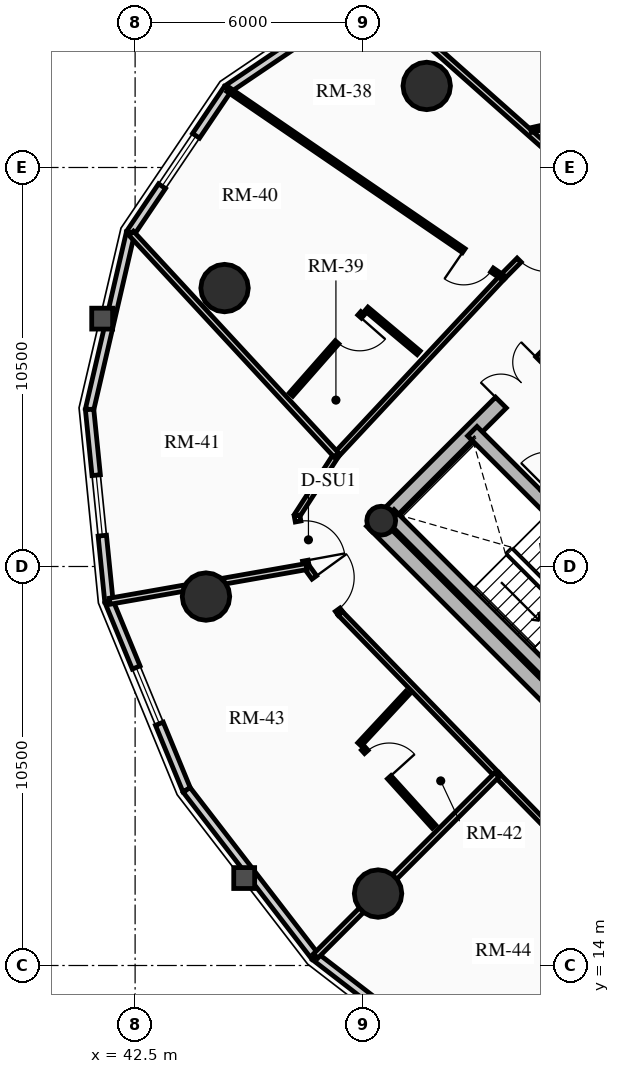
"""IFC4 building model, lengths in metres.
Left out: names, types, materials, properties, quantities, classifications, styles, units other than length and angle.
Written with IfcOpenShell. Run it as: python <this file> out.ifc"""

import sys

from ifc_helpers import new_model, si_unit, direction, frame, frame_2d, origin, origin_2d, place, context, subcontext, project, spatial, rectangle, circle, hollow_circle, extrude, source, transform, mapped, element, fill, save


model = new_model("IFC4")
c1 = context("Model", 3, precision=1e-05, world=origin(), true_north=direction((0.0, 1.0)))
c2 = subcontext(c1, "Body", "Model", "MODEL_VIEW")
j1 = project(units=[si_unit("LENGTHUNIT", "METRE"), si_unit("PLANEANGLEUNIT", "RADIAN")], contexts=[c1])
p1 = place(None, origin())
s1 = spatial("IfcSite", under=j1, at=p1, CompositionType="ELEMENT")
p2 = place(p1, origin())
s2 = spatial("IfcBuilding", under=s1, at=p2, CompositionType="ELEMENT")
p3 = place(p2, frame((0.0, 0.0, 154.51)))
s3 = spatial("IfcBuildingStorey", under=s2, at=p3, CompositionType="ELEMENT", Elevation=154.51)
p4 = place(p3, frame((58.702, 15.732, 0.0), z_axis=(0.0, 0.0, 1.0), x_axis=(-0.707106781187, 0.707106781187, 0.0)))
e1 = element("IfcWall", 1, at=p4, inside=s3, PredefinedType="SHEAR", context=c2, shape_type="SweptSolid", body=[
    extrude(rectangle(XDim=14.1, YDim=0.4, at=frame_2d((7.05, 0.0))), origin(), (0.0, 0.0, 1.0), 2.91),
])
p5 = place(p3, frame((48.873, 25.561, 0.0), z_axis=(0.0, 0.0, 1.0), x_axis=(0.707106781187, 0.707106781187, 0.0)))
e2 = element("IfcWall", 2, at=p5, inside=s3, PredefinedType="SHEAR", context=c2, shape_type="SweptSolid", body=[
    extrude(rectangle(XDim=10.7, YDim=0.4, at=frame_2d((5.35, 0.0))), origin(), (0.0, 0.0, 1.0), 2.91),
])
m1 = source(origin(), c2, "Body", "SweptSolid", [
    extrude(rectangle(XDim=1.5, YDim=2.02, at=frame_2d((0.75, 1.01))), frame((0.0, 0.21, 0.0), z_axis=(0.0, -1.0, 0.0), x_axis=(1.0, 0.0, 0.0)), (0.0, 0.0, 1.0), 0.42),
])
p6 = place(p5, frame((4.6, 0.0, 0.0)))
e3 = element("IfcOpeningElement", 3, at=p6, cuts=e2, PredefinedType="OPENING", context=c2, shape_type="MappedRepresentation", body=[
    mapped(m1, transform((0.0, 0.0, 0.0), x_axis=(1.0, 0.0, 0.0), y_axis=(0.0, 1.0, 0.0), z_axis=(0.0, 0.0, 1.0), scale=1.0)),
])
p7 = place(p3, frame((61.06, 18.373, 0.0), z_axis=(0.0, 0.0, 1.0), x_axis=(-0.707106781187, 0.707106781187, 0.0)))
e4 = element("IfcWall", 4, at=p7, inside=s3, PredefinedType="SHEAR", context=c2, shape_type="SweptSolid", body=[
    extrude(rectangle(XDim=13.7, YDim=0.35, at=frame_2d((6.85, 0.0))), origin(), (0.0, 0.0, 1.0), 2.91),
])
m2 = source(origin(), c2, "Body", "SweptSolid", [
    extrude(rectangle(XDim=1.1, YDim=2.015, at=frame_2d((0.55, 1.007))), frame((0.0, 0.185, 0.0), z_axis=(0.0, -1.0, 0.0), x_axis=(1.0, 0.0, 0.0)), (0.0, 0.0, 1.0), 0.37),
])
p8 = place(p7, frame((4.85, 0.0, 0.0)))
e5 = element("IfcOpeningElement", 5, at=p8, cuts=e4, PredefinedType="OPENING", context=c2, shape_type="MappedRepresentation", body=[
    mapped(m2, transform((0.0, 0.0, 0.0), x_axis=(1.0, 0.0, 0.0), y_axis=(0.0, 1.0, 0.0), z_axis=(0.0, 0.0, 1.0), scale=1.0)),
])
p9 = place(p7, frame((0.625, 0.0, 0.0)))
e6 = element("IfcOpeningElement", 6, at=p9, cuts=e4, PredefinedType="OPENING", context=c2, shape_type="MappedRepresentation", body=[
    mapped(m2, transform((0.0, 0.0, 0.0), x_axis=(1.0, 0.0, 0.0), y_axis=(0.0, 1.0, 0.0), z_axis=(0.0, 0.0, 1.0), scale=1.0)),
])
p10 = place(p7, frame((2.625, 0.0, 0.0)))
e7 = element("IfcOpeningElement", 7, at=p10, cuts=e4, PredefinedType="OPENING", context=c2, shape_type="MappedRepresentation", body=[
    mapped(m2, transform((0.0, 0.0, 0.0), x_axis=(1.0, 0.0, 0.0), y_axis=(0.0, 1.0, 0.0), z_axis=(0.0, 0.0, 1.0), scale=1.0)),
])
m3 = source(origin(), c2, "Body", "SweptSolid", [
    extrude(rectangle(XDim=1.15, YDim=2.02, at=frame_2d((0.575, 1.01))), frame((0.0, 0.185, 0.0), z_axis=(0.0, -1.0, 0.0), x_axis=(1.0, 0.0, 0.0)), (0.0, 0.0, 1.0), 0.37),
])
p11 = place(p7, frame((7.27, 0.0, 0.0)))
e8 = element("IfcOpeningElement", 8, at=p11, cuts=e4, PredefinedType="OPENING", context=c2, shape_type="MappedRepresentation", body=[
    mapped(m3, transform((0.0, 0.0, 0.0), x_axis=(1.0, 0.0, 0.0), y_axis=(0.0, 1.0, 0.0), z_axis=(0.0, 0.0, 1.0), scale=1.0)),
])
p12 = place(p3, frame((53.922, 21.141, 0.0), z_axis=(0.0, 0.0, 1.0), x_axis=(-0.707106781187, 0.707106781187, 0.0)))
e9 = element("IfcWall", 9, at=p12, inside=s3, PredefinedType="SHEAR", context=c2, shape_type="SweptSolid", body=[
    extrude(rectangle(XDim=6.695, YDim=0.35, at=frame_2d((3.348, 0.0))), origin(), (0.0, 0.0, 1.0), 2.91),
])
p13 = place(p3, frame((48.976, 25.706, 0.0), z_axis=(0.0, 0.0, 1.0), x_axis=(0.707106781187, 0.707106781187, 0.0)))
e10 = element("IfcColumn", 10, at=p13, inside=s3, PredefinedType="COLUMN", context=c2, shape_type="SweptSolid", body=[
    extrude(hollow_circle(Radius=0.38, WallThickness=0.032, at=origin_2d()), origin(), (0.0, 0.0, 1.0), 2.91),
])
for number, where, z_axis, x_axis in (
    (11, (50.173, 37.146, 0.0), (0.0, 0.0, 1.0), (1.0, 0.0, 0.0)),
    (12, (44.854, 31.827, 0.0), (0.0, 0.0, 1.0), (1.0, 0.0, 0.0)),
    (13, (44.365, 23.709, 0.0), (0.0, 0.0, 1.0), (1.0, 0.0, 0.0)),
    (14, (48.893, 15.893, 0.0), (0.0, 0.0, 1.0), (1.0, 0.0, 0.0)),
):
    element("IfcColumn", number, at=place(p3, frame(where, z_axis=z_axis, x_axis=x_axis)), inside=s3, PredefinedType="USERDEFINED", context=c2, shape_type="SweptSolid", body=[
        extrude(circle(Radius=0.625, at=origin_2d()), origin(), (0.0, 0.0, 1.0), 2.91),
    ])
p14 = place(p3, frame((44.935, 37.065, 0.0), z_axis=(0.0, 0.0, 1.0), x_axis=(0.828739009952, 0.559635286042, 0.0)))
e15 = element("IfcWall", 15, at=p14, inside=s3, PredefinedType="SOLIDWALL", context=c2, shape_type="SweptSolid", body=[
    extrude(rectangle(XDim=4.569, YDim=0.22, at=frame_2d((2.284, 0.0))), origin(), (0.0, 0.0, 1.0), 2.245),
])
p15 = place(p3, frame((42.378, 33.279, 0.0), z_axis=(0.0, 0.0, 1.0), x_axis=(0.559635286042, 0.828739009952, 0.0)))
e16 = element("IfcWall", 16, at=p15, inside=s3, PredefinedType="SOLIDWALL", context=c2, shape_type="SweptSolid", body=[
    extrude(rectangle(XDim=4.569, YDim=0.22, at=frame_2d((2.284, 0.0))), origin(), (0.0, 0.0, 1.0), 2.245),
])
m4 = source(origin(), c2, "Body", "SweptSolid", [
    extrude(rectangle(XDim=1.6, YDim=1.3, at=frame_2d((0.8, 0.65))), frame((0.0, 0.12, 0.0), z_axis=(0.0, -1.0, 0.0), x_axis=(1.0, 0.0, 0.0)), (0.0, 0.0, 1.0), 0.24),
])
p16 = place(p15, frame((1.484, 0.0, 0.65)))
e17 = element("IfcOpeningElement", 17, at=p16, cuts=e16, PredefinedType="OPENING", context=c2, shape_type="MappedRepresentation", body=[
    mapped(m4, transform((0.0, 0.0, 0.0), x_axis=(1.0, 0.0, 0.0), y_axis=(0.0, 1.0, 0.0), z_axis=(0.0, 0.0, 1.0), scale=1.0)),
])
p17 = place(p3, frame((41.302, 28.633, 0.0), z_axis=(0.0, 0.0, 1.0), x_axis=(0.225659540039, 0.974206226622, 0.0)))
e18 = element("IfcWall", 18, at=p17, inside=s3, PredefinedType="SOLIDWALL", context=c2, shape_type="SweptSolid", body=[
    extrude(rectangle(XDim=4.769, YDim=0.22, at=frame_2d((2.385, 0.0))), origin(), (0.0, 0.0, 1.0), 2.245),
])
p18 = place(p3, frame((41.811, 23.582, 0.0), z_axis=(0.0, 0.0, 1.0), x_axis=(-0.100279889424, 0.994959267396, 0.0)))
e19 = element("IfcWall", 19, at=p18, inside=s3, PredefinedType="SOLIDWALL", context=c2, shape_type="SweptSolid", body=[
    extrude(rectangle(XDim=5.076, YDim=0.22, at=frame_2d((2.538, 0.0))), origin(), (0.0, 0.0, 1.0), 2.245),
])
p19 = place(p18, frame((1.738, 0.0, 0.65)))
e20 = element("IfcOpeningElement", 20, at=p19, cuts=e19, PredefinedType="OPENING", context=c2, shape_type="MappedRepresentation", body=[
    mapped(m4, transform((0.0, 0.0, 0.0), x_axis=(1.0, 0.0, 0.0), y_axis=(0.0, 1.0, 0.0), z_axis=(0.0, 0.0, 1.0), scale=1.0)),
])
p20 = place(p3, frame((43.856, 18.622, 0.0), z_axis=(0.0, 0.0, 1.0), x_axis=(-0.38111364655, 0.924528197738, 0.0)))
e21 = element("IfcWall", 21, at=p20, inside=s3, PredefinedType="SOLIDWALL", context=c2, shape_type="SweptSolid", body=[
    extrude(rectangle(XDim=5.366, YDim=0.22, at=frame_2d((2.683, 0.0))), origin(), (0.0, 0.0, 1.0), 2.245),
])
p21 = place(p20, frame((1.883, 0.0, 0.65)))
e22 = element("IfcOpeningElement", 22, at=p21, cuts=e21, PredefinedType="OPENING", context=c2, shape_type="MappedRepresentation", body=[
    mapped(m4, transform((0.0, 0.0, 0.0), x_axis=(1.0, 0.0, 0.0), y_axis=(0.0, 1.0, 0.0), z_axis=(0.0, 0.0, 1.0), scale=1.0)),
])
p22 = place(p3, frame((47.236, 14.236, 0.0), z_axis=(0.0, 0.0, 1.0), x_axis=(-0.610543584779, 0.791982658323, 0.0)))
e23 = element("IfcWall", 23, at=p22, inside=s3, PredefinedType="SOLIDWALL", context=c2, shape_type="SweptSolid", body=[
    extrude(rectangle(XDim=5.537, YDim=0.22, at=frame_2d((2.769, 0.0))), origin(), (0.0, 0.0, 1.0), 2.245),
])
p23 = place(p3, frame((51.622, 10.856, 0.0), z_axis=(0.0, 0.0, 1.0), x_axis=(-0.791982658323, 0.610543584779, 0.0)))
e24 = element("IfcWall", 24, at=p23, inside=s3, PredefinedType="SOLIDWALL", context=c2, shape_type="SweptSolid", body=[
    extrude(rectangle(XDim=5.537, YDim=0.22, at=frame_2d((2.769, 0.0))), origin(), (0.0, 0.0, 1.0), 2.245),
])
p24 = place(p23, frame((1.968, 0.0, 0.65)))
e25 = element("IfcOpeningElement", 25, at=p24, cuts=e24, PredefinedType="OPENING", context=c2, shape_type="MappedRepresentation", body=[
    mapped(m4, transform((0.0, 0.0, 0.0), x_axis=(1.0, 0.0, 0.0), y_axis=(0.0, 1.0, 0.0), z_axis=(0.0, 0.0, 1.0), scale=1.0)),
])
p25 = place(p3, frame((54.501, 34.479, 0.0), z_axis=(0.0, 0.0, 1.0), x_axis=(-0.70346073929, -0.710734119258, 0.0)))
e26 = element("IfcWall", 26, at=p25, inside=s3, PredefinedType="PARTITIONING", context=c2, shape_type="SweptSolid", body=[
    extrude(rectangle(XDim=3.323, YDim=0.15, at=frame_2d((1.662, 0.0))), origin(), (0.0, 0.0, 1.0), 2.245),
])
m5 = source(origin(), c2, "Body", "SweptSolid", [
    extrude(rectangle(XDim=1.05, YDim=2.015, at=frame_2d((0.525, 1.007))), frame((0.0, 0.085, 0.0), z_axis=(0.0, -1.0, 0.0), x_axis=(1.0, 0.0, 0.0)), (0.0, 0.0, 1.0), 0.17),
])
p26 = place(p25, frame((1.645, 0.0, 0.0)))
e27 = element("IfcOpeningElement", 27, at=p26, cuts=e26, PredefinedType="OPENING", context=c2, shape_type="MappedRepresentation", body=[
    mapped(m5, transform((0.0, 0.0, 0.0), x_axis=(1.0, 0.0, 0.0), y_axis=(0.0, 1.0, 0.0), z_axis=(0.0, 0.0, 1.0), scale=1.0)),
])
p27 = place(p3, frame((52.163, 32.117, 0.0), z_axis=(0.0, 0.0, 1.0), x_axis=(-0.682485296115, -0.730899323154, 0.0)))
e28 = element("IfcWall", 28, at=p27, inside=s3, PredefinedType="PARTITIONING", context=c2, shape_type="SweptSolid", body=[
    extrude(rectangle(XDim=6.404, YDim=0.15, at=frame_2d((3.202, 0.0))), origin(), (0.0, 0.0, 1.0), 2.245),
])
p28 = place(p3, frame((47.792, 27.436, 0.0), z_axis=(0.0, 0.0, 1.0), x_axis=(-0.543086162542, -0.839676973637, 0.0)))
e29 = element("IfcWall", 29, at=p28, inside=s3, PredefinedType="PARTITIONING", context=c2, shape_type="SweptSolid", body=[
    extrude(rectangle(XDim=1.901, YDim=0.15, at=frame_2d((0.95, 0.0))), origin(), (0.0, 0.0, 1.0), 2.245),
])
p29 = place(p3, frame((46.76, 25.84, 0.0), z_axis=(0.0, 0.0, 1.0), x_axis=(0.181230731673, -0.983440604153, 0.0)))
e30 = element("IfcWall", 30, at=p29, inside=s3, PredefinedType="PARTITIONING", context=c2, shape_type="SweptSolid", body=[
    extrude(rectangle(XDim=1.365, YDim=0.15, at=frame_2d((0.682, 0.0))), origin(), (0.0, 0.0, 1.0), 2.245),
])
p30 = place(p29, frame((0.157, 0.0, 0.0)))
e31 = element("IfcOpeningElement", 31, at=p30, cuts=e30, PredefinedType="OPENING", context=c2, shape_type="MappedRepresentation", body=[
    mapped(m5, transform((0.0, 0.0, 0.0), x_axis=(1.0, 0.0, 0.0), y_axis=(0.0, 1.0, 0.0), z_axis=(0.0, 0.0, 1.0), scale=1.0)),
])
p31 = place(p3, frame((47.008, 24.498, 0.0), z_axis=(0.0, 0.0, 1.0), x_axis=(0.586941299514, -0.809629489906, 0.0)))
e32 = element("IfcWall", 32, at=p31, inside=s3, PredefinedType="PARTITIONING", context=c2, shape_type="SweptSolid", body=[
    extrude(rectangle(XDim=1.523, YDim=0.15, at=frame_2d((0.761, 0.0))), origin(), (0.0, 0.0, 1.0), 2.245),
])
p32 = place(p31, frame((0.353, 0.0, 0.0)))
e33 = element("IfcOpeningElement", 33, at=p32, cuts=e32, PredefinedType="OPENING", context=c2, shape_type="MappedRepresentation", body=[
    mapped(m5, transform((0.0, 0.0, 0.0), x_axis=(1.0, 0.0, 0.0), y_axis=(0.0, 1.0, 0.0), z_axis=(0.0, 0.0, 1.0), scale=1.0)),
])
p33 = place(p3, frame((47.901, 23.265, 0.0), z_axis=(0.0, 0.0, 1.0), x_axis=(0.696355965374, -0.717696572019, 0.0)))
e34 = element("IfcWall", 34, at=p33, inside=s3, PredefinedType="PARTITIONING", context=c2, shape_type="SweptSolid", body=[
    extrude(rectangle(XDim=5.915, YDim=0.15, at=frame_2d((2.957, 0.0))), origin(), (0.0, 0.0, 1.0), 2.675),
])
p34 = place(p3, frame((52.02, 19.02, 0.0), z_axis=(0.0, 0.0, 1.0), x_axis=(0.699456449804, -0.71467522332, 0.0)))
e35 = element("IfcWall", 35, at=p34, inside=s3, PredefinedType="PARTITIONING", context=c2, shape_type="SweptSolid", body=[
    extrude(rectangle(XDim=6.032, YDim=0.15, at=frame_2d((3.016, 0.0))), origin(), (0.0, 0.0, 1.0), 2.245),
])
p35 = place(p3, frame((54.501, 34.479, 0.0), z_axis=(0.0, 0.0, 1.0), x_axis=(-0.747641382601, 0.66410267506, 0.0)))
e36 = element("IfcWall", 36, at=p35, inside=s3, PredefinedType="PARTITIONING", context=c2, shape_type="SweptSolid", body=[
    extrude(rectangle(XDim=7.718, YDim=0.16, at=frame_2d((3.859, 0.0))), origin(), (0.0, 0.0, 1.0), 2.245),
])
p36 = place(p3, frame((47.792, 27.436, 0.0), z_axis=(0.0, 0.0, 1.0), x_axis=(-0.679077160958, 0.734066897132, 0.0)))
e37 = element("IfcWall", 37, at=p36, inside=s3, PredefinedType="PARTITIONING", context=c2, shape_type="SweptSolid", body=[
    extrude(rectangle(XDim=7.947, YDim=0.16, at=frame_2d((3.974, 0.0))), origin(), (0.0, 0.0, 1.0), 2.245),
])
p37 = place(p3, frame((47.008, 24.498, 0.0), z_axis=(0.0, 0.0, 1.0), x_axis=(-0.984823741496, -0.173557478046, 0.0)))
e38 = element("IfcWall", 38, at=p37, inside=s3, PredefinedType="PARTITIONING", context=c2, shape_type="SweptSolid", body=[
    extrude(rectangle(XDim=5.257, YDim=0.16, at=frame_2d((2.628, 0.0))), origin(), (0.0, 0.0, 1.0), 2.245),
])
p38 = place(p3, frame((52.02, 19.02, 0.0), z_axis=(0.0, 0.0, 1.0), x_axis=(-0.707106781187, -0.707106781187, 0.0)))
e39 = element("IfcWall", 39, at=p38, inside=s3, PredefinedType="PARTITIONING", context=c2, shape_type="SweptSolid", body=[
    extrude(rectangle(XDim=6.745, YDim=0.16, at=frame_2d((3.373, 0.0))), origin(), (0.0, 0.0, 1.0), 2.245),
])
p39 = place(p3, frame((54.858, 36.425, 0.0), z_axis=(0.0, 0.0, 1.0), x_axis=(-0.975061820415, -0.221933427785, 0.0)))
e40 = element("IfcWall", 40, at=p39, inside=s3, PredefinedType="PARTITIONING", context=c2, shape_type="SweptSolid", body=[
    extrude(rectangle(XDim=1.993, YDim=0.125, at=frame_2d((0.997, 0.0))), origin(), (0.0, 0.0, 1.0), 2.675),
])
m6 = source(origin(), c2, "Body", "SweptSolid", [
    extrude(rectangle(XDim=0.9, YDim=2.005, at=frame_2d((0.45, 1.002))), frame((0.0, 0.073, 0.0), z_axis=(0.0, -1.0, 0.0), x_axis=(1.0, 0.0, 0.0)), (0.0, 0.0, 1.0), 0.145),
])
p40 = place(p39, frame((0.44, 0.0, 0.0)))
e41 = element("IfcOpeningElement", 41, at=p40, cuts=e40, PredefinedType="OPENING", context=c2, shape_type="MappedRepresentation", body=[
    mapped(m6, transform((0.0, 0.0, 0.0), x_axis=(1.0, 0.0, 0.0), y_axis=(0.0, 1.0, 0.0), z_axis=(0.0, 0.0, 1.0), scale=1.0)),
])
p41 = place(p3, frame((52.163, 32.117, 0.0), z_axis=(0.0, 0.0, 1.0), x_axis=(-0.825403853282, 0.564542716707, 0.0)))
e42 = element("IfcWall", 42, at=p41, inside=s3, PredefinedType="PARTITIONING", context=c2, shape_type="SweptSolid", body=[
    extrude(rectangle(XDim=8.74, YDim=0.125, at=frame_2d((4.37, 0.0))), origin(), (0.0, 0.0, 1.0), 2.245),
])
p42 = place(p41, frame((0.33, 0.0, 0.0)))
e43 = element("IfcOpeningElement", 43, at=p42, cuts=e42, PredefinedType="OPENING", context=c2, shape_type="MappedRepresentation", body=[
    mapped(m6, transform((0.0, 0.0, 0.0), x_axis=(1.0, 0.0, 0.0), y_axis=(0.0, 1.0, 0.0), z_axis=(0.0, 0.0, 1.0), scale=1.0)),
])
p43 = place(p3, frame((49.961, 30.124, 0.0), z_axis=(0.0, 0.0, 1.0), x_axis=(-0.766210982885, 0.64258908309, 0.0)))
e44 = element("IfcWall", 44, at=p43, inside=s3, PredefinedType="PARTITIONING", context=c2, shape_type="SweptSolid", body=[
    extrude(rectangle(XDim=1.795, YDim=0.125, at=frame_2d((0.897, 0.0))), origin(), (0.0, 0.0, 1.0), 2.675),
])
p44 = place(p3, frame((48.488, 31.166, 0.0), z_axis=(0.0, 0.0, 1.0), x_axis=(-0.660635615229, -0.750706722956, 0.0)))
e45 = element("IfcWall", 45, at=p44, inside=s3, PredefinedType="PARTITIONING", context=c2, shape_type="SweptSolid", body=[
    extrude(rectangle(XDim=2.852, YDim=0.125, at=frame_2d((1.426, 0.0))), origin(), (0.0, 0.0, 1.0), 2.245),
])
p45 = place(p44, frame((0.12, 0.0, 0.0)))
e46 = element("IfcOpeningElement", 46, at=p45, cuts=e45, PredefinedType="OPENING", context=c2, shape_type="MappedRepresentation", body=[
    mapped(m6, transform((0.0, 0.0, 0.0), x_axis=(1.0, 0.0, 0.0), y_axis=(0.0, 1.0, 0.0), z_axis=(0.0, 0.0, 1.0), scale=1.0)),
])
p46 = place(p3, frame((49.665, 21.171, 0.0), z_axis=(0.0, 0.0, 1.0), x_axis=(-0.681089123144, -0.73220052331, 0.0)))
e47 = element("IfcWall", 47, at=p46, inside=s3, PredefinedType="PARTITIONING", context=c2, shape_type="SweptSolid", body=[
    extrude(rectangle(XDim=1.849, YDim=0.125, at=frame_2d((0.924, 0.0))), origin(), (0.0, 0.0, 1.0), 2.675),
])
p47 = place(p3, frame((48.503, 19.711, 0.0), z_axis=(0.0, 0.0, 1.0), x_axis=(0.671201050003, -0.741275354018, 0.0)))
e48 = element("IfcWall", 48, at=p47, inside=s3, PredefinedType="PARTITIONING", context=c2, shape_type="SweptSolid", body=[
    extrude(rectangle(XDim=2.777, YDim=0.125, at=frame_2d((1.388, 0.0))), origin(), (0.0, 0.0, 1.0), 2.675),
])
p48 = place(p47, frame((0.12, 0.0, 0.0)))
e49 = element("IfcOpeningElement", 49, at=p48, cuts=e48, PredefinedType="OPENING", context=c2, shape_type="MappedRepresentation", body=[
    mapped(m6, transform((0.0, 0.0, 0.0), x_axis=(1.0, 0.0, 0.0), y_axis=(0.0, 1.0, 0.0), z_axis=(0.0, 0.0, 1.0), scale=1.0)),
])
m7 = source(origin(), c2, "Body", "SweptSolid", [
    extrude(rectangle(XDim=1.6, YDim=1.3, at=frame_2d((0.8, 0.65))), frame((0.0, 0.03, 0.0), z_axis=(0.0, -1.0, 0.0), x_axis=(1.0, 0.0, 0.0)), (0.0, 0.0, 1.0), 0.06),
])
p49 = place(p16, origin())
e50 = element("IfcWindow", 50, at=p49, inside=s3, PartitioningType="SINGLE_PANEL", PredefinedType="WINDOW", context=c2, shape_type="MappedRepresentation", body=[
    mapped(m7, transform((0.0, 0.0, 0.0), x_axis=(1.0, 0.0, 0.0), y_axis=(0.0, 1.0, 0.0), z_axis=(0.0, 0.0, 1.0), scale=1.0)),
])
fill(e17, e50)
p50 = place(p19, origin())
e51 = element("IfcWindow", 51, at=p50, inside=s3, PartitioningType="SINGLE_PANEL", PredefinedType="WINDOW", context=c2, shape_type="MappedRepresentation", body=[
    mapped(m7, transform((0.0, 0.0, 0.0), x_axis=(1.0, 0.0, 0.0), y_axis=(0.0, 1.0, 0.0), z_axis=(0.0, 0.0, 1.0), scale=1.0)),
])
fill(e20, e51)
p51 = place(p21, origin())
e52 = element("IfcWindow", 52, at=p51, inside=s3, PartitioningType="SINGLE_PANEL", PredefinedType="WINDOW", context=c2, shape_type="MappedRepresentation", body=[
    mapped(m7, transform((0.0, 0.0, 0.0), x_axis=(1.0, 0.0, 0.0), y_axis=(0.0, 1.0, 0.0), z_axis=(0.0, 0.0, 1.0), scale=1.0)),
])
fill(e22, e52)
m8 = source(origin(), c2, "Body", "SweptSolid", [
    extrude(rectangle(XDim=1.5, YDim=2.02, at=frame_2d((0.75, 1.01))), frame((0.0, 0.025, 0.0), z_axis=(0.0, -1.0, 0.0), x_axis=(1.0, 0.0, 0.0)), (0.0, 0.0, 1.0), 0.05),
])
p52 = place(p6, origin())
e53 = element("IfcDoor", 53, at=p52, inside=s3, OperationType="DOUBLE_DOOR_SINGLE_SWING", PredefinedType="DOOR", context=c2, shape_type="MappedRepresentation", body=[
    mapped(m8, transform((0.0, 0.0, 0.0), x_axis=(1.0, 0.0, 0.0), y_axis=(0.0, 1.0, 0.0), z_axis=(0.0, 0.0, 1.0), scale=1.0)),
])
fill(e3, e53)
m9 = source(origin(), c2, "Body", "SweptSolid", [
    extrude(rectangle(XDim=1.05, YDim=2.015, at=frame_2d((0.525, 1.007))), frame((0.0, 0.025, 0.0), z_axis=(0.0, -1.0, 0.0), x_axis=(1.0, 0.0, 0.0)), (0.0, 0.0, 1.0), 0.05),
])
p53 = place(p26, origin())
e54 = element("IfcDoor", 54, at=p53, inside=s3, OperationType="SINGLE_SWING_LEFT", PredefinedType="DOOR", context=c2, shape_type="MappedRepresentation", body=[
    mapped(m9, transform((0.0, 0.0, 0.0), x_axis=(1.0, 0.0, 0.0), y_axis=(0.0, 1.0, 0.0), z_axis=(0.0, 0.0, 1.0), scale=1.0)),
])
fill(e27, e54)
m10 = source(origin(), c2, "Body", "SweptSolid", [
    extrude(rectangle(XDim=0.9, YDim=2.005, at=frame_2d((0.45, 1.002))), frame((0.0, 0.025, 0.0), z_axis=(0.0, -1.0, 0.0), x_axis=(1.0, 0.0, 0.0)), (0.0, 0.0, 1.0), 0.05),
])
p54 = place(p42, origin())
e55 = element("IfcDoor", 55, at=p54, inside=s3, OperationType="SINGLE_SWING_RIGHT", PredefinedType="DOOR", context=c2, shape_type="MappedRepresentation", body=[
    mapped(m10, transform((0.0, 0.0, 0.0), x_axis=(1.0, 0.0, 0.0), y_axis=(0.0, 1.0, 0.0), z_axis=(0.0, 0.0, 1.0), scale=1.0)),
])
fill(e43, e55)
p55 = place(p45, origin())
e56 = element("IfcDoor", 56, at=p55, inside=s3, OperationType="SINGLE_SWING_LEFT", PredefinedType="DOOR", context=c2, shape_type="MappedRepresentation", body=[
    mapped(m10, transform((0.0, 0.0, 0.0), x_axis=(1.0, 0.0, 0.0), y_axis=(0.0, 1.0, 0.0), z_axis=(0.0, 0.0, 1.0), scale=1.0)),
])
fill(e46, e56)
p56 = place(p30, origin())
e57 = element("IfcDoor", 57, at=p56, inside=s3, OperationType="SINGLE_SWING_RIGHT", PredefinedType="DOOR", context=c2, shape_type="MappedRepresentation", body=[
    mapped(m9, transform((0.0, 0.0, 0.0), x_axis=(1.0, 0.0, 0.0), y_axis=(0.0, 1.0, 0.0), z_axis=(0.0, 0.0, 1.0), scale=1.0)),
])
fill(e31, e57)
p57 = place(p32, origin())
e58 = element("IfcDoor", 58, at=p57, inside=s3, OperationType="SINGLE_SWING_LEFT", PredefinedType="DOOR", context=c2, shape_type="MappedRepresentation", body=[
    mapped(m9, transform((0.0, 0.0, 0.0), x_axis=(1.0, 0.0, 0.0), y_axis=(0.0, 1.0, 0.0), z_axis=(0.0, 0.0, 1.0), scale=1.0)),
])
fill(e33, e58)
p58 = place(p48, origin())
e59 = element("IfcDoor", 59, at=p58, inside=s3, OperationType="SINGLE_SWING_RIGHT", PredefinedType="DOOR", context=c2, shape_type="MappedRepresentation", body=[
    mapped(m10, transform((0.0, 0.0, 0.0), x_axis=(1.0, 0.0, 0.0), y_axis=(0.0, 1.0, 0.0), z_axis=(0.0, 0.0, 1.0), scale=1.0)),
])
fill(e49, e59)
save(model, sys.argv[1])
